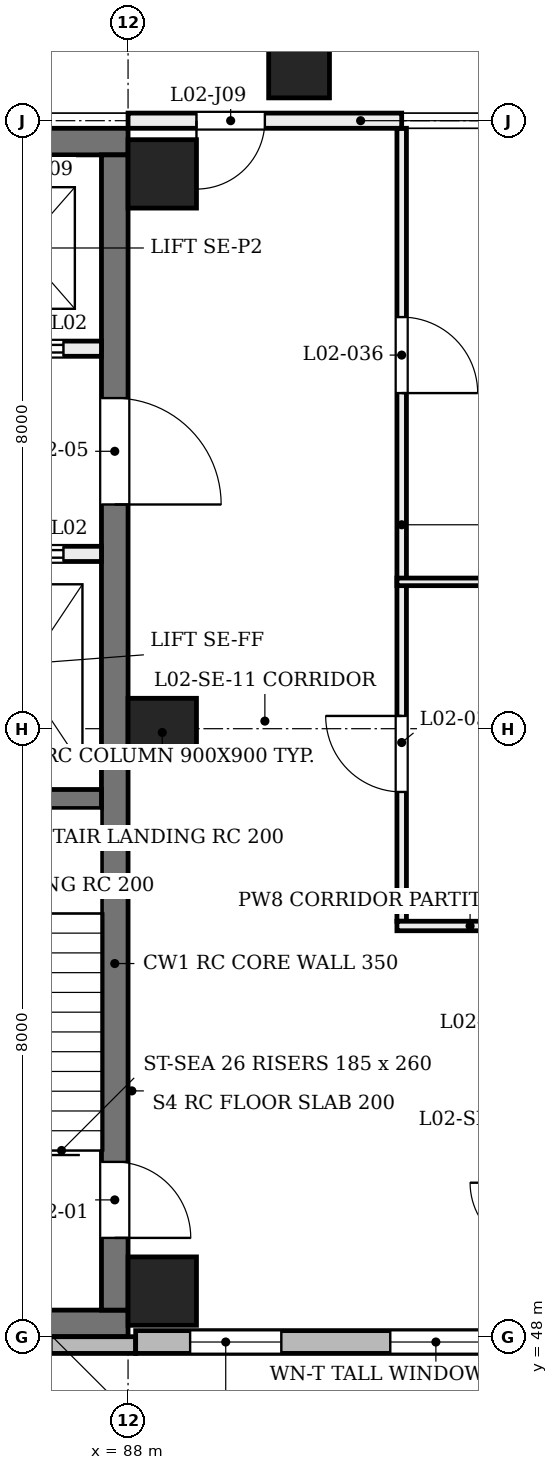
"""IFC4 building model, lengths in metres.
Left out: names, types, materials, properties, quantities, classifications, styles, units other than length and angle.
Written with IfcOpenShell. Run it as: python <this file> out.ifc"""

import sys

from ifc_helpers import new_model, si_unit, direction, frame, frame_2d, origin, origin_2d, place, context, subcontext, project, spatial, rectangle, extrude, element, fill, save


model = new_model("IFC4")
c1 = context("Model", 3, precision=1e-05, world=origin(), true_north=direction((0.0, 1.0)))
c2 = subcontext(c1, "Body", "Model", "MODEL_VIEW")
j1 = project(units=[si_unit("LENGTHUNIT", "METRE"), si_unit("PLANEANGLEUNIT", "RADIAN")], contexts=[c1])
p1 = place(None, origin())
s1 = spatial("IfcSite", under=j1, at=p1, CompositionType="ELEMENT")
p2 = place(p1, origin())
s2 = spatial("IfcBuilding", under=s1, at=p2, CompositionType="ELEMENT")
p3 = place(p2, frame((0.0, 0.0, 9.6)))
s3 = spatial("IfcBuildingStorey", under=s2, at=p3, CompositionType="ELEMENT", Elevation=9.6)
for number, where, z_axis, x_axis in (
    (1, (80.1, 48.175, 0.0), (0.0, 0.0, 1.0), (1.0, 0.0, 0.0)),
    (2, (80.1, 63.725, 0.0), (0.0, 0.0, 1.0), (1.0, 0.0, 0.0)),
):
    element("IfcWall", number, at=place(p3, frame(where, z_axis=z_axis, x_axis=x_axis)), inside=s3, PredefinedType="SHEAR", context=c2, shape_type="SweptSolid", body=[
        extrude(rectangle(XDim=7.9, YDim=0.35, at=frame_2d((3.95, 0.0))), origin(), (0.0, 0.0, 1.0), 4.58),
    ])
p4 = place(p3, frame((87.825, 48.35, 0.0), z_axis=(0.0, 0.0, 1.0), x_axis=(0.0, 1.0, 0.0)))
e3 = element("IfcWall", 3, at=p4, inside=s3, PredefinedType="SHEAR", context=c2, shape_type="SweptSolid", body=[
    extrude(rectangle(XDim=15.2, YDim=0.35, at=frame_2d((7.6, 0.0))), origin(), (0.0, 0.0, 1.0), 4.58),
])
p5 = place(p4, frame((0.95, 0.0, 0.0)))
e4 = element("IfcOpeningElement", 4, at=p5, cuts=e3, PredefinedType="OPENING", context=c2, shape_type="SweptSolid", body=[
    extrude(rectangle(XDim=1.0, YDim=2.1, at=frame_2d((0.5, 1.05))), frame((0.0, 0.185, 0.0), z_axis=(0.0, -1.0, 0.0), x_axis=(1.0, 0.0, 0.0)), (0.0, 0.0, 1.0), 0.37),
])
p6 = place(p4, frame((10.6, 0.0, 0.0)))
e5 = element("IfcOpeningElement", 5, at=p6, cuts=e3, PredefinedType="OPENING", context=c2, shape_type="SweptSolid", body=[
    extrude(rectangle(XDim=1.4, YDim=2.1, at=frame_2d((0.7, 1.05))), frame((0.0, 0.185, 0.0), z_axis=(0.0, -1.0, 0.0), x_axis=(1.0, 0.0, 0.0)), (0.0, 0.0, 1.0), 0.37),
])
for number, where, z_axis, x_axis in (
    (6, (88.45, 48.6, 0.0), (0.0, 0.0, 1.0), (1.0, 0.0, 0.0)),
    (7, (88.45, 55.95, 0.0), (0.0, 0.0, 1.0), (1.0, 0.0, 0.0)),
    (8, (88.45, 63.3, 0.0), (0.0, 0.0, 1.0), (1.0, 0.0, 0.0)),
):
    element("IfcColumn", number, at=place(p3, frame(where, z_axis=z_axis, x_axis=x_axis)), inside=s3, PredefinedType="COLUMN", context=c2, shape_type="SweptSolid", body=[
        extrude(rectangle(XDim=0.9, YDim=0.9, at=origin_2d()), origin(), (0.0, 0.0, 1.0), 4.8),
    ])
p7 = place(p3, frame((90.0, 64.7, 0.0), z_axis=(0.203962208122, 0.0, 0.978978762618), x_axis=(0.0, 1.0, 0.0)))
e9 = element("IfcColumn", 9, at=p7, inside=s3, PredefinedType="COLUMN", context=c2, shape_type="SweptSolid", body=[
    extrude(rectangle(XDim=0.8, YDim=0.8, at=origin_2d()), origin(), (0.0, 0.0, 1.0), 4.903),
])
p8 = place(p3, frame((79.9, 47.89, 0.0), z_axis=(0.0, 0.0, 1.0), x_axis=(1.0, 0.0, 0.0)))
e10 = element("IfcWall", 10, at=p8, inside=s3, PredefinedType="SOLIDWALL", context=c2, shape_type="SweptSolid", body=[
    extrude(rectangle(XDim=8.2, YDim=0.22, at=frame_2d((4.1, 0.0))), origin(), (0.0, 0.0, 1.0), 3.9),
])
p9 = place(p8, frame((1.308, 0.0, 0.9)))
e11 = element("IfcOpeningElement", 11, at=p9, cuts=e10, PredefinedType="OPENING", context=c2, shape_type="SweptSolid", body=[
    extrude(rectangle(XDim=0.45, YDim=2.6, at=frame_2d((0.225, 1.3))), frame((0.0, 0.12, 0.0), z_axis=(0.0, -1.0, 0.0), x_axis=(1.0, 0.0, 0.0)), (0.0, 0.0, 1.0), 0.24),
])
p10 = place(p8, frame((3.975, 0.0, 0.9)))
e12 = element("IfcOpeningElement", 12, at=p10, cuts=e10, PredefinedType="OPENING", context=c2, shape_type="SweptSolid", body=[
    extrude(rectangle(XDim=0.45, YDim=2.6, at=frame_2d((0.225, 1.3))), frame((0.0, 0.12, 0.0), z_axis=(0.0, -1.0, 0.0), x_axis=(1.0, 0.0, 0.0)), (0.0, 0.0, 1.0), 0.24),
])
p11 = place(p8, frame((6.642, 0.0, 0.9)))
e13 = element("IfcOpeningElement", 13, at=p11, cuts=e10, PredefinedType="OPENING", context=c2, shape_type="SweptSolid", body=[
    extrude(rectangle(XDim=0.45, YDim=2.6, at=frame_2d((0.225, 1.3))), frame((0.0, 0.12, 0.0), z_axis=(0.0, -1.0, 0.0), x_axis=(1.0, 0.0, 0.0)), (0.0, 0.0, 1.0), 0.24),
])
p12 = place(p3, frame((88.1, 47.93, 0.0), z_axis=(0.0, 0.0, 1.0), x_axis=(1.0, 0.0, 0.0)))
e14 = element("IfcWall", 14, at=p12, inside=s3, PredefinedType="SOLIDWALL", context=c2, shape_type="SweptSolid", body=[
    extrude(rectangle(XDim=7.9, YDim=0.3, at=frame_2d((3.95, 0.0))), origin(), (0.0, 0.0, 1.0), 3.9),
])
p13 = place(p12, frame((0.717, 0.0, 0.75)))
e15 = element("IfcOpeningElement", 15, at=p13, cuts=e14, PredefinedType="OPENING", context=c2, shape_type="SweptSolid", body=[
    extrude(rectangle(XDim=1.2, YDim=3.1, at=frame_2d((0.6, 1.55))), frame((0.0, 0.16, 0.0), z_axis=(0.0, -1.0, 0.0), x_axis=(1.0, 0.0, 0.0)), (0.0, 0.0, 1.0), 0.32),
])
p14 = place(p12, frame((3.35, 0.0, 0.75)))
e16 = element("IfcOpeningElement", 16, at=p14, cuts=e14, PredefinedType="OPENING", context=c2, shape_type="SweptSolid", body=[
    extrude(rectangle(XDim=1.2, YDim=3.1, at=frame_2d((0.6, 1.55))), frame((0.0, 0.16, 0.0), z_axis=(0.0, -1.0, 0.0), x_axis=(1.0, 0.0, 0.0)), (0.0, 0.0, 1.0), 0.32),
])
p15 = place(p12, frame((5.983, 0.0, 0.75)))
e17 = element("IfcOpeningElement", 17, at=p15, cuts=e14, PredefinedType="OPENING", context=c2, shape_type="SweptSolid", body=[
    extrude(rectangle(XDim=1.2, YDim=3.1, at=frame_2d((0.6, 1.55))), frame((0.0, 0.16, 0.0), z_axis=(0.0, -1.0, 0.0), x_axis=(1.0, 0.0, 0.0)), (0.0, 0.0, 1.0), 0.32),
])
p16 = place(p3, frame((87.65, 55.075, 0.0), z_axis=(0.0, 0.0, 1.0), x_axis=(-1.0, 0.0, 0.0)))
e18 = element("IfcWall", 18, at=p16, inside=s3, PredefinedType="SOLIDWALL", context=c2, shape_type="SweptSolid", body=[
    extrude(rectangle(XDim=3.1, YDim=0.25, at=frame_2d((1.55, 0.0))), origin(), (0.0, 0.0, 1.0), 4.55),
])
p17 = place(p3, frame((87.65, 58.3, 0.0), z_axis=(0.0, 0.0, 1.0), x_axis=(-1.0, 0.0, 0.0)))
e19 = element("IfcWall", 19, at=p17, inside=s3, PredefinedType="SOLIDWALL", context=c2, shape_type="SweptSolid", body=[
    extrude(rectangle(XDim=7.2, YDim=0.2, at=frame_2d((3.6, 0.0))), origin(), (0.0, 0.0, 1.0), 4.55),
])
p18 = place(p17, frame((0.5, 0.0, 0.0)))
e20 = element("IfcOpeningElement", 20, at=p18, cuts=e19, PredefinedType="OPENING", context=c2, shape_type="SweptSolid", body=[
    extrude(rectangle(XDim=1.1, YDim=2.1, at=frame_2d((0.55, 1.05))), frame((0.0, 0.11, 0.0), z_axis=(0.0, -1.0, 0.0), x_axis=(1.0, 0.0, 0.0)), (0.0, 0.0, 1.0), 0.22),
])
p19 = place(p17, frame((5.6, 0.0, 0.0)))
e21 = element("IfcOpeningElement", 21, at=p19, cuts=e19, PredefinedType="OPENING", context=c2, shape_type="SweptSolid", body=[
    extrude(rectangle(XDim=1.1, YDim=2.1, at=frame_2d((0.55, 1.05))), frame((0.0, 0.11, 0.0), z_axis=(0.0, -1.0, 0.0), x_axis=(1.0, 0.0, 0.0)), (0.0, 0.0, 1.0), 0.22),
])
p20 = place(p17, frame((3.1, 0.0, 0.0)))
e22 = element("IfcOpeningElement", 22, at=p20, cuts=e19, PredefinedType="OPENING", context=c2, shape_type="SweptSolid", body=[
    extrude(rectangle(XDim=1.0, YDim=2.1, at=frame_2d((0.5, 1.05))), frame((0.0, 0.11, 0.0), z_axis=(0.0, -1.0, 0.0), x_axis=(1.0, 0.0, 0.0)), (0.0, 0.0, 1.0), 0.22),
])
p21 = place(p3, frame((87.65, 61.0, 0.0), z_axis=(0.0, 0.0, 1.0), x_axis=(-1.0, 0.0, 0.0)))
e23 = element("IfcWall", 23, at=p21, inside=s3, PredefinedType="SOLIDWALL", context=c2, shape_type="SweptSolid", body=[
    extrude(rectangle(XDim=7.2, YDim=0.2, at=frame_2d((3.6, 0.0))), origin(), (0.0, 0.0, 1.0), 4.55),
])
p22 = place(p21, frame((0.5, 0.0, 0.0)))
e24 = element("IfcOpeningElement", 24, at=p22, cuts=e23, PredefinedType="OPENING", context=c2, shape_type="SweptSolid", body=[
    extrude(rectangle(XDim=1.1, YDim=2.1, at=frame_2d((0.55, 1.05))), frame((0.0, 0.11, 0.0), z_axis=(0.0, -1.0, 0.0), x_axis=(1.0, 0.0, 0.0)), (0.0, 0.0, 1.0), 0.22),
])
p23 = place(p21, frame((5.6, 0.0, 0.0)))
e25 = element("IfcOpeningElement", 25, at=p23, cuts=e23, PredefinedType="OPENING", context=c2, shape_type="SweptSolid", body=[
    extrude(rectangle(XDim=1.1, YDim=2.1, at=frame_2d((0.55, 1.05))), frame((0.0, 0.11, 0.0), z_axis=(0.0, -1.0, 0.0), x_axis=(1.0, 0.0, 0.0)), (0.0, 0.0, 1.0), 0.22),
])
p24 = place(p21, frame((3.1, 0.0, 0.0)))
e26 = element("IfcOpeningElement", 26, at=p24, cuts=e23, PredefinedType="OPENING", context=c2, shape_type="SweptSolid", body=[
    extrude(rectangle(XDim=1.0, YDim=2.1, at=frame_2d((0.5, 1.05))), frame((0.0, 0.11, 0.0), z_axis=(0.0, -1.0, 0.0), x_axis=(1.0, 0.0, 0.0)), (0.0, 0.0, 1.0), 0.22),
])
p25 = place(p3, frame((91.6, 53.467, 0.0), z_axis=(0.0, 0.0, 1.0), x_axis=(0.0, 1.0, 0.0)))
e27 = element("IfcWall", 27, at=p25, inside=s3, PredefinedType="PARTITIONING", context=c2, shape_type="SweptSolid", body=[
    extrude(rectangle(XDim=10.433, YDim=0.125, at=frame_2d((5.217, 0.0))), origin(), (0.0, 0.0, 1.0), 3.88),
])
p26 = place(p25, frame((1.701, 0.0, 0.0)))
e28 = element("IfcOpeningElement", 28, at=p26, cuts=e27, PredefinedType="OPENING", context=c2, shape_type="SweptSolid", body=[
    extrude(rectangle(XDim=1.0, YDim=2.1, at=frame_2d((0.5, 1.05))), frame((0.0, 0.073, 0.0), z_axis=(0.0, -1.0, 0.0), x_axis=(1.0, 0.0, 0.0)), (0.0, 0.0, 1.0), 0.145),
])
p27 = place(p25, frame((6.949, 0.0, 0.0)))
e29 = element("IfcOpeningElement", 29, at=p27, cuts=e27, PredefinedType="OPENING", context=c2, shape_type="SweptSolid", body=[
    extrude(rectangle(XDim=1.0, YDim=2.1, at=frame_2d((0.5, 1.05))), frame((0.0, 0.073, 0.0), z_axis=(0.0, -1.0, 0.0), x_axis=(1.0, 0.0, 0.0)), (0.0, 0.0, 1.0), 0.145),
])
p28 = place(p3, frame((91.538, 53.404, 0.0), z_axis=(0.0, 0.0, 1.0), x_axis=(1.0, 0.0, 0.0)))
e30 = element("IfcWall", 30, at=p28, inside=s3, PredefinedType="PARTITIONING", context=c2, shape_type="SweptSolid", body=[
    extrude(rectangle(XDim=1.925, YDim=0.125, at=frame_2d((0.962, 0.0))), origin(), (0.0, 0.0, 1.0), 4.56),
])
p29 = place(p3, frame((91.538, 57.932, 0.0), z_axis=(0.0, 0.0, 1.0), x_axis=(1.0, 0.0, 0.0)))
e31 = element("IfcWall", 31, at=p29, inside=s3, PredefinedType="PARTITIONING", context=c2, shape_type="SweptSolid", body=[
    extrude(rectangle(XDim=4.382, YDim=0.1, at=frame_2d((2.191, 0.0))), origin(), (0.0, 0.0, 1.0), 3.88),
])
p30 = place(p3, frame((88.0, 64.0, 0.0), z_axis=(0.0, 0.0, 1.0), x_axis=(1.0, 0.0, 0.0)))
e32 = element("IfcWall", 32, at=p30, inside=s3, PredefinedType="PARTITIONING", context=c2, shape_type="SweptSolid", body=[
    extrude(rectangle(XDim=3.6, YDim=0.2, at=frame_2d((1.8, 0.0))), origin(), (0.0, 0.0, 1.0), 3.88),
])
p31 = place(p30, frame((0.9, 0.0, 0.0)))
e33 = element("IfcOpeningElement", 33, at=p31, cuts=e32, PredefinedType="OPENING", context=c2, shape_type="SweptSolid", body=[
    extrude(rectangle(XDim=0.9, YDim=2.1, at=frame_2d((0.45, 1.05))), frame((0.0, 0.11, 0.0), z_axis=(0.0, -1.0, 0.0), x_axis=(1.0, 0.0, 0.0)), (0.0, 0.0, 1.0), 0.22),
])
p32 = place(p13, origin())
e34 = element("IfcWindow", 34, at=p32, inside=s3, PartitioningType="SINGLE_PANEL", PredefinedType="WINDOW", context=c2, shape_type="SweptSolid", body=[
    extrude(rectangle(XDim=1.2, YDim=3.1, at=frame_2d((0.6, 1.55))), frame((0.0, 0.03, 0.0), z_axis=(0.0, -1.0, 0.0), x_axis=(1.0, 0.0, 0.0)), (0.0, 0.0, 1.0), 0.06),
])
fill(e15, e34)
p33 = place(p14, origin())
e35 = element("IfcWindow", 35, at=p33, inside=s3, PartitioningType="SINGLE_PANEL", PredefinedType="WINDOW", context=c2, shape_type="SweptSolid", body=[
    extrude(rectangle(XDim=1.2, YDim=3.1, at=frame_2d((0.6, 1.55))), frame((0.0, 0.03, 0.0), z_axis=(0.0, -1.0, 0.0), x_axis=(1.0, 0.0, 0.0)), (0.0, 0.0, 1.0), 0.06),
])
fill(e16, e35)
p34 = place(p5, frame((1.0, 0.0, 0.0), z_axis=(0.0, 0.0, 1.0), x_axis=(-1.0, 0.0, 0.0)))
e36 = element("IfcDoor", 36, at=p34, inside=s3, OperationType="SINGLE_SWING_LEFT", PredefinedType="DOOR", context=c2, shape_type="SweptSolid", body=[
    extrude(rectangle(XDim=1.0, YDim=2.1, at=frame_2d((0.5, 1.05))), frame((0.0, 0.025, 0.0), z_axis=(0.0, -1.0, 0.0), x_axis=(1.0, 0.0, 0.0)), (0.0, 0.0, 1.0), 0.05),
])
fill(e4, e36)
p35 = place(p18, frame((1.1, 0.0, 0.0), z_axis=(0.0, 0.0, 1.0), x_axis=(-1.0, 0.0, 0.0)))
e37 = element("IfcDoor", 37, at=p35, inside=s3, OperationType="DOUBLE_DOOR_SLIDING", PredefinedType="DOOR", context=c2, shape_type="SweptSolid", body=[
    extrude(rectangle(XDim=1.1, YDim=2.1, at=frame_2d((0.55, 1.05))), frame((0.0, 0.025, 0.0), z_axis=(0.0, -1.0, 0.0), x_axis=(1.0, 0.0, 0.0)), (0.0, 0.0, 1.0), 0.05),
])
fill(e20, e37)
p36 = place(p22, origin())
e38 = element("IfcDoor", 38, at=p36, inside=s3, OperationType="DOUBLE_DOOR_SLIDING", PredefinedType="DOOR", context=c2, shape_type="SweptSolid", body=[
    extrude(rectangle(XDim=1.1, YDim=2.1, at=frame_2d((0.55, 1.05))), frame((0.0, 0.025, 0.0), z_axis=(0.0, -1.0, 0.0), x_axis=(1.0, 0.0, 0.0)), (0.0, 0.0, 1.0), 0.05),
])
fill(e24, e38)
p37 = place(p6, frame((1.4, 0.0, 0.0), z_axis=(0.0, 0.0, 1.0), x_axis=(-1.0, 0.0, 0.0)))
e39 = element("IfcDoor", 39, at=p37, inside=s3, OperationType="SINGLE_SWING_LEFT", PredefinedType="DOOR", context=c2, shape_type="SweptSolid", body=[
    extrude(rectangle(XDim=1.4, YDim=2.1, at=frame_2d((0.7, 1.05))), frame((0.0, 0.025, 0.0), z_axis=(0.0, -1.0, 0.0), x_axis=(1.0, 0.0, 0.0)), (0.0, 0.0, 1.0), 0.05),
])
fill(e5, e39)
p38 = place(p26, frame((1.0, 0.0, 0.0), z_axis=(0.0, 0.0, 1.0), x_axis=(-1.0, 0.0, 0.0)))
e40 = element("IfcDoor", 40, at=p38, inside=s3, OperationType="SINGLE_SWING_RIGHT", PredefinedType="DOOR", context=c2, shape_type="SweptSolid", body=[
    extrude(rectangle(XDim=1.0, YDim=2.1, at=frame_2d((0.5, 1.05))), frame((0.0, 0.025, 0.0), z_axis=(0.0, -1.0, 0.0), x_axis=(1.0, 0.0, 0.0)), (0.0, 0.0, 1.0), 0.05),
])
fill(e28, e40)
p39 = place(p27, frame((1.0, 0.0, 0.0), z_axis=(0.0, 0.0, 1.0), x_axis=(-1.0, 0.0, 0.0)))
e41 = element("IfcDoor", 41, at=p39, inside=s3, OperationType="SINGLE_SWING_LEFT", PredefinedType="DOOR", context=c2, shape_type="SweptSolid", body=[
    extrude(rectangle(XDim=1.0, YDim=2.1, at=frame_2d((0.5, 1.05))), frame((0.0, 0.025, 0.0), z_axis=(0.0, -1.0, 0.0), x_axis=(1.0, 0.0, 0.0)), (0.0, 0.0, 1.0), 0.05),
])
fill(e29, e41)
p40 = place(p31, frame((0.9, 0.0, 0.0), z_axis=(0.0, 0.0, 1.0), x_axis=(-1.0, 0.0, 0.0)))
e42 = element("IfcDoor", 42, at=p40, inside=s3, OperationType="SINGLE_SWING_LEFT", PredefinedType="DOOR", context=c2, shape_type="SweptSolid", body=[
    extrude(rectangle(XDim=0.9, YDim=2.1, at=frame_2d((0.45, 1.05))), frame((0.0, 0.025, 0.0), z_axis=(0.0, -1.0, 0.0), x_axis=(1.0, 0.0, 0.0)), (0.0, 0.0, 1.0), 0.05),
])
fill(e33, e42)
save(model, sys.argv[1])
